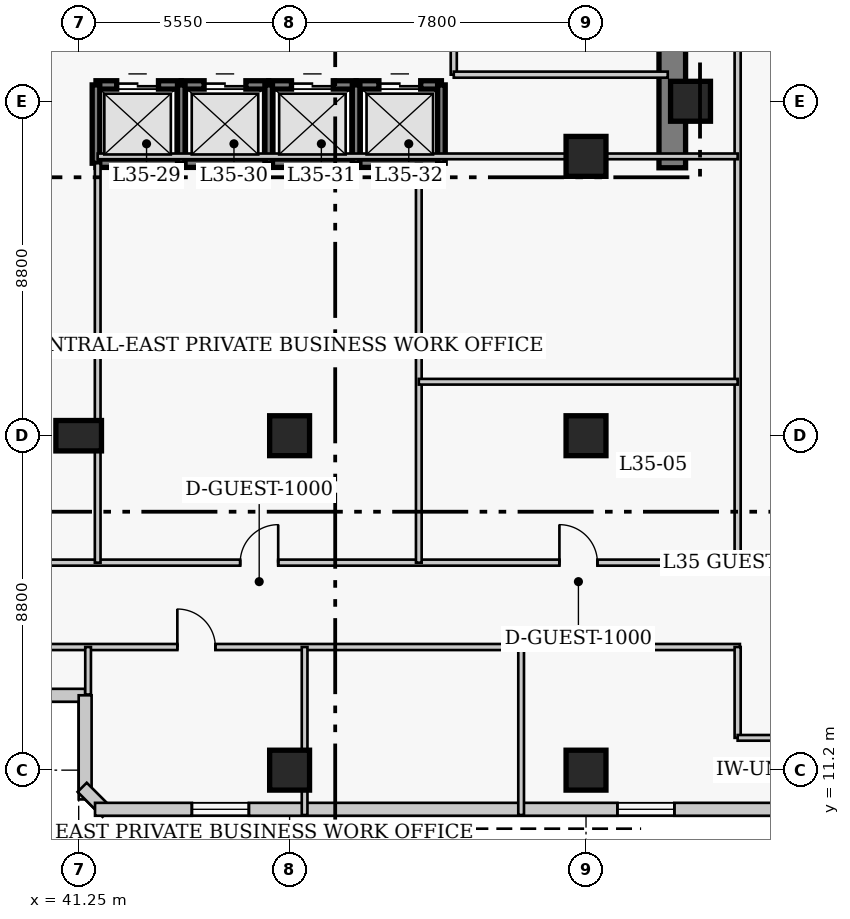
"""IFC4 building model, lengths in metres.
Left out: names, types, materials, properties, quantities, classifications, styles, units other than length and angle.
Written with IfcOpenShell. Run it as: python <this file> out.ifc"""

import sys

from ifc_helpers import new_model, si_unit, direction, frame, frame_2d, origin, origin_2d, place, context, subcontext, project, spatial, rectangle, extrude, element, fill, save


model = new_model("IFC4")
c1 = context("Model", 3, precision=1e-05, world=origin(), true_north=direction((0.0, 1.0)))
c2 = subcontext(c1, "Body", "Model", "MODEL_VIEW")
j1 = project(units=[si_unit("LENGTHUNIT", "METRE"), si_unit("PLANEANGLEUNIT", "RADIAN")], contexts=[c1])
p1 = place(None, origin())
s1 = spatial("IfcSite", under=j1, at=p1, CompositionType="ELEMENT")
p2 = place(p1, origin())
s2 = spatial("IfcBuilding", under=s1, at=p2, CompositionType="ELEMENT")
p3 = place(p2, frame((0.0, 0.0, 142.2)))
s3 = spatial("IfcBuildingStorey", under=s2, at=p3, CompositionType="ELEMENT", Elevation=142.2)
p4 = place(p3, frame((56.87, 27.05, 0.0), z_axis=(0.0, 0.0, 1.0), x_axis=(0.0, 1.0, 0.0)))
e1 = element("IfcWall", 1, at=p4, inside=s3, PredefinedType="SHEAR", context=c2, shape_type="SweptSolid", body=[
    extrude(rectangle(XDim=13.62, YDim=0.7, at=frame_2d((6.81, 0.0))), origin(), (0.0, 0.0, 1.0), 3.8),
])
p5 = place(p3, frame((41.25, 20.0, 0.0), z_axis=(0.0, 0.0, 1.0), x_axis=(1.0, 0.0, 0.0)))
e2 = element("IfcColumn", 2, at=p5, inside=s3, PredefinedType="COLUMN", context=c2, shape_type="SweptSolid", body=[
    extrude(rectangle(XDim=1.2, YDim=0.8, at=origin_2d()), origin(), (0.0, 0.0, 1.0), 3.8),
])
for number, where, z_axis, x_axis in (
    (3, (46.8, 11.2, 0.0), (0.0, 0.0, 1.0), (1.0, 0.0, 0.0)),
    (4, (46.8, 20.0, 0.0), (0.0, 0.0, 1.0), (1.0, 0.0, 0.0)),
    (5, (54.6, 11.2, 0.0), (0.0, 0.0, 1.0), (1.0, 0.0, 0.0)),
    (6, (54.6, 20.0, 0.0), (0.0, 0.0, 1.0), (1.0, 0.0, 0.0)),
    (7, (57.35, 28.8, 0.0), (0.0, 0.0, 1.0), (1.0, 0.0, 0.0)),
    (8, (54.6, 27.35, 0.0), (0.0, 0.0, 1.0), (1.0, 0.0, 0.0)),
):
    element("IfcColumn", number, at=place(p3, frame(where, z_axis=z_axis, x_axis=x_axis)), inside=s3, PredefinedType="COLUMN", context=c2, shape_type="SweptSolid", body=[
        extrude(rectangle(XDim=1.05, YDim=1.05, at=origin_2d()), origin(), (0.0, 0.0, 1.0), 3.8),
    ])
p6 = place(p3, frame((36.58, 13.17, 0.0), z_axis=(0.0, 0.0, 1.0), x_axis=(1.0, 0.0, 0.0)))
e9 = element("IfcWall", 9, at=p6, inside=s3, PredefinedType="SOLIDWALL", context=c2, shape_type="SweptSolid", body=[
    extrude(rectangle(XDim=4.84, YDim=0.34, at=frame_2d((2.42, 0.0))), origin(), (0.0, 0.0, 1.0), 3.55),
])
p7 = place(p6, frame((1.67, 0.0, 0.85)))
e10 = element("IfcOpeningElement", 10, at=p7, cuts=e9, PredefinedType="OPENING", context=c2, shape_type="SweptSolid", body=[
    extrude(rectangle(XDim=1.5, YDim=1.75, at=frame_2d((0.75, 0.875))), frame((0.0, 0.18, 0.0), z_axis=(0.0, -1.0, 0.0), x_axis=(1.0, 0.0, 0.0)), (0.0, 0.0, 1.0), 0.36),
])
p8 = place(p3, frame((41.42, 13.17, 0.0), z_axis=(0.0, 0.0, 1.0), x_axis=(0.0, -1.0, 0.0)))
e11 = element("IfcWall", 11, at=p8, inside=s3, PredefinedType="SOLIDWALL", context=c2, shape_type="SweptSolid", body=[
    extrude(rectangle(XDim=2.74, YDim=0.34, at=frame_2d((1.37, 0.0))), origin(), (0.0, 0.0, 1.0), 3.55),
])
p9 = place(p3, frame((41.342, 10.749, 0.0), z_axis=(0.0, 0.0, 1.0), x_axis=(0.707106781187, -0.707106781187, 0.0)))
e12 = element("IfcWall", 12, at=p9, inside=s3, PredefinedType="SOLIDWALL", context=c2, shape_type="SweptSolid", body=[
    extrude(rectangle(XDim=0.929, YDim=0.34, at=frame_2d((0.464, 0.0))), origin(), (0.0, 0.0, 1.0), 3.55),
])
p10 = place(p3, frame((41.68, 10.17, 0.0), z_axis=(0.0, 0.0, 1.0), x_axis=(1.0, 0.0, 0.0)))
e13 = element("IfcWall", 13, at=p10, inside=s3, PredefinedType="SOLIDWALL", context=c2, shape_type="SweptSolid", body=[
    extrude(rectangle(XDim=26.69, YDim=0.34, at=frame_2d((13.345, 0.0))), origin(), (0.0, 0.0, 1.0), 3.55),
])
p11 = place(p10, frame((2.548, 0.0, 0.85)))
e14 = element("IfcOpeningElement", 14, at=p11, cuts=e13, PredefinedType="OPENING", context=c2, shape_type="SweptSolid", body=[
    extrude(rectangle(XDim=1.5, YDim=1.75, at=frame_2d((0.75, 0.875))), frame((0.0, 0.18, 0.0), z_axis=(0.0, -1.0, 0.0), x_axis=(1.0, 0.0, 0.0)), (0.0, 0.0, 1.0), 0.36),
])
p12 = place(p10, frame((13.745, 0.0, 0.85)))
e15 = element("IfcOpeningElement", 15, at=p12, cuts=e13, PredefinedType="OPENING", context=c2, shape_type="SweptSolid", body=[
    extrude(rectangle(XDim=1.5, YDim=1.75, at=frame_2d((0.75, 0.875))), frame((0.0, 0.18, 0.0), z_axis=(0.0, -1.0, 0.0), x_axis=(1.0, 0.0, 0.0)), (0.0, 0.0, 1.0), 0.36),
])
p13 = place(p10, frame((21.492, 0.0, 0.85)))
e16 = element("IfcOpeningElement", 16, at=p13, cuts=e13, PredefinedType="OPENING", context=c2, shape_type="SweptSolid", body=[
    extrude(rectangle(XDim=1.5, YDim=1.75, at=frame_2d((0.75, 0.875))), frame((0.0, 0.18, 0.0), z_axis=(0.0, -1.0, 0.0), x_axis=(1.0, 0.0, 0.0)), (0.0, 0.0, 1.0), 0.36),
])
p14 = place(p3, frame((41.705, 29.23, 0.0), z_axis=(0.0, 0.0, 1.0), x_axis=(1.0, 0.0, 0.0)))
e17 = element("IfcWall", 17, at=p14, inside=s3, PredefinedType="SHEAR", context=c2, shape_type="SweptSolid", body=[
    extrude(rectangle(XDim=2.245, YDim=0.22, at=frame_2d((1.123, 0.0))), origin(), (0.0, 0.0, 1.0), 3.8),
])
p15 = place(p14, frame((0.545, 0.0, 0.0)))
e18 = element("IfcOpeningElement", 18, at=p15, cuts=e17, PredefinedType="OPENING", context=c2, shape_type="SweptSolid", body=[
    extrude(rectangle(XDim=1.1, YDim=2.15, at=frame_2d((0.55, 1.075))), frame((0.0, 0.12, 0.0), z_axis=(0.0, -1.0, 0.0), x_axis=(1.0, 0.0, 0.0)), (0.0, 0.0, 1.0), 0.24),
])
p16 = place(p3, frame((41.705, 27.17, 0.0), z_axis=(0.0, 0.0, 1.0), x_axis=(1.0, 0.0, 0.0)))
e19 = element("IfcWall", 19, at=p16, inside=s3, PredefinedType="SHEAR", context=c2, shape_type="SweptSolid", body=[
    extrude(rectangle(XDim=2.245, YDim=0.22, at=frame_2d((1.123, 0.0))), origin(), (0.0, 0.0, 1.0), 3.8),
])
p17 = place(p3, frame((41.705, 27.17, 0.0), z_axis=(0.0, 0.0, 1.0), x_axis=(0.0, 1.0, 0.0)))
e20 = element("IfcWall", 20, at=p17, inside=s3, PredefinedType="SHEAR", context=c2, shape_type="SweptSolid", body=[
    extrude(rectangle(XDim=2.06, YDim=0.2, at=frame_2d((1.03, 0.0))), origin(), (0.0, 0.0, 1.0), 3.8),
])
p18 = place(p3, frame((43.95, 29.23, 0.0), z_axis=(0.0, 0.0, 1.0), x_axis=(1.0, 0.0, 0.0)))
e21 = element("IfcWall", 21, at=p18, inside=s3, PredefinedType="SHEAR", context=c2, shape_type="SweptSolid", body=[
    extrude(rectangle(XDim=2.3, YDim=0.22, at=frame_2d((1.15, 0.0))), origin(), (0.0, 0.0, 1.0), 3.8),
])
p19 = place(p18, frame((0.6, 0.0, 0.0)))
e22 = element("IfcOpeningElement", 22, at=p19, cuts=e21, PredefinedType="OPENING", context=c2, shape_type="SweptSolid", body=[
    extrude(rectangle(XDim=1.1, YDim=2.15, at=frame_2d((0.55, 1.075))), frame((0.0, 0.12, 0.0), z_axis=(0.0, -1.0, 0.0), x_axis=(1.0, 0.0, 0.0)), (0.0, 0.0, 1.0), 0.24),
])
p20 = place(p3, frame((43.95, 27.17, 0.0), z_axis=(0.0, 0.0, 1.0), x_axis=(1.0, 0.0, 0.0)))
e23 = element("IfcWall", 23, at=p20, inside=s3, PredefinedType="SHEAR", context=c2, shape_type="SweptSolid", body=[
    extrude(rectangle(XDim=2.3, YDim=0.22, at=frame_2d((1.15, 0.0))), origin(), (0.0, 0.0, 1.0), 3.8),
])
p21 = place(p3, frame((43.95, 27.17, 0.0), z_axis=(0.0, 0.0, 1.0), x_axis=(0.0, 1.0, 0.0)))
e24 = element("IfcWall", 24, at=p21, inside=s3, PredefinedType="SHEAR", context=c2, shape_type="SweptSolid", body=[
    extrude(rectangle(XDim=2.06, YDim=0.2, at=frame_2d((1.03, 0.0))), origin(), (0.0, 0.0, 1.0), 3.8),
])
p22 = place(p3, frame((46.25, 29.23, 0.0), z_axis=(0.0, 0.0, 1.0), x_axis=(1.0, 0.0, 0.0)))
e25 = element("IfcWall", 25, at=p22, inside=s3, PredefinedType="SHEAR", context=c2, shape_type="SweptSolid", body=[
    extrude(rectangle(XDim=2.3, YDim=0.22, at=frame_2d((1.15, 0.0))), origin(), (0.0, 0.0, 1.0), 3.8),
])
p23 = place(p22, frame((0.6, 0.0, 0.0)))
e26 = element("IfcOpeningElement", 26, at=p23, cuts=e25, PredefinedType="OPENING", context=c2, shape_type="SweptSolid", body=[
    extrude(rectangle(XDim=1.1, YDim=2.15, at=frame_2d((0.55, 1.075))), frame((0.0, 0.12, 0.0), z_axis=(0.0, -1.0, 0.0), x_axis=(1.0, 0.0, 0.0)), (0.0, 0.0, 1.0), 0.24),
])
p24 = place(p3, frame((46.25, 27.17, 0.0), z_axis=(0.0, 0.0, 1.0), x_axis=(1.0, 0.0, 0.0)))
e27 = element("IfcWall", 27, at=p24, inside=s3, PredefinedType="SHEAR", context=c2, shape_type="SweptSolid", body=[
    extrude(rectangle(XDim=2.3, YDim=0.22, at=frame_2d((1.15, 0.0))), origin(), (0.0, 0.0, 1.0), 3.8),
])
p25 = place(p3, frame((46.25, 27.17, 0.0), z_axis=(0.0, 0.0, 1.0), x_axis=(0.0, 1.0, 0.0)))
e28 = element("IfcWall", 28, at=p25, inside=s3, PredefinedType="SHEAR", context=c2, shape_type="SweptSolid", body=[
    extrude(rectangle(XDim=2.06, YDim=0.2, at=frame_2d((1.03, 0.0))), origin(), (0.0, 0.0, 1.0), 3.8),
])
p26 = place(p3, frame((48.55, 29.23, 0.0), z_axis=(0.0, 0.0, 1.0), x_axis=(1.0, 0.0, 0.0)))
e29 = element("IfcWall", 29, at=p26, inside=s3, PredefinedType="SHEAR", context=c2, shape_type="SweptSolid", body=[
    extrude(rectangle(XDim=2.245, YDim=0.22, at=frame_2d((1.123, 0.0))), origin(), (0.0, 0.0, 1.0), 3.8),
])
p27 = place(p26, frame((0.6, 0.0, 0.0)))
e30 = element("IfcOpeningElement", 30, at=p27, cuts=e29, PredefinedType="OPENING", context=c2, shape_type="SweptSolid", body=[
    extrude(rectangle(XDim=1.1, YDim=2.15, at=frame_2d((0.55, 1.075))), frame((0.0, 0.12, 0.0), z_axis=(0.0, -1.0, 0.0), x_axis=(1.0, 0.0, 0.0)), (0.0, 0.0, 1.0), 0.24),
])
p28 = place(p3, frame((48.55, 27.17, 0.0), z_axis=(0.0, 0.0, 1.0), x_axis=(1.0, 0.0, 0.0)))
e31 = element("IfcWall", 31, at=p28, inside=s3, PredefinedType="SHEAR", context=c2, shape_type="SweptSolid", body=[
    extrude(rectangle(XDim=2.245, YDim=0.22, at=frame_2d((1.123, 0.0))), origin(), (0.0, 0.0, 1.0), 3.8),
])
for number, where, z_axis, x_axis in (
    (32, (48.55, 27.17, 0.0), (0.0, 0.0, 1.0), (0.0, 1.0, 0.0)),
    (33, (50.795, 27.17, 0.0), (0.0, 0.0, 1.0), (0.0, 1.0, 0.0)),
):
    element("IfcWall", number, at=place(p3, frame(where, z_axis=z_axis, x_axis=x_axis)), inside=s3, PredefinedType="SHEAR", context=c2, shape_type="SweptSolid", body=[
        extrude(rectangle(XDim=2.06, YDim=0.2, at=frame_2d((1.03, 0.0))), origin(), (0.0, 0.0, 1.0), 3.8),
    ])
p29 = place(p3, frame((51.12, 29.5, 0.0), z_axis=(0.0, 0.0, 1.0), x_axis=(0.0, 1.0, 0.0)))
e34 = element("IfcWall", 34, at=p29, inside=s3, PredefinedType="PARTITIONING", context=c2, shape_type="SweptSolid", body=[
    extrude(rectangle(XDim=3.7, YDim=0.16, at=frame_2d((1.85, 0.0))), origin(), (0.0, 0.0, 1.0), 3.55),
])
p30 = place(p29, frame((0.9, 0.0, 0.0)))
e35 = element("IfcOpeningElement", 35, at=p30, cuts=e34, PredefinedType="OPENING", context=c2, shape_type="SweptSolid", body=[
    extrude(rectangle(XDim=1.1, YDim=2.15, at=frame_2d((0.55, 1.075))), frame((0.0, 0.09, 0.0), z_axis=(0.0, -1.0, 0.0), x_axis=(1.0, 0.0, 0.0)), (0.0, 0.0, 1.0), 0.18),
])
p31 = place(p3, frame((51.12, 29.5, 0.0), z_axis=(0.0, 0.0, 1.0), x_axis=(1.0, 0.0, 0.0)))
e36 = element("IfcWall", 36, at=p31, inside=s3, PredefinedType="PARTITIONING", context=c2, shape_type="SweptSolid", body=[
    extrude(rectangle(XDim=5.63, YDim=0.16, at=frame_2d((2.815, 0.0))), origin(), (0.0, 0.0, 1.0), 3.55),
])
p32 = place(p3, frame((35.85, 16.66, 0.0), z_axis=(0.0, 0.0, 1.0), x_axis=(1.0, 0.0, 0.0)))
e37 = element("IfcWall", 37, at=p32, inside=s3, PredefinedType="PARTITIONING", context=c2, shape_type="SweptSolid", body=[
    extrude(rectangle(XDim=22.8, YDim=0.16, at=frame_2d((11.4, 0.0))), origin(), (0.0, 0.0, 1.0), 3.55),
])
p33 = place(p32, frame((9.65, 0.0, 0.0)))
e38 = element("IfcOpeningElement", 38, at=p33, cuts=e37, PredefinedType="OPENING", context=c2, shape_type="SweptSolid", body=[
    extrude(rectangle(XDim=1.0, YDim=2.15, at=frame_2d((0.5, 1.075))), frame((0.0, 0.09, 0.0), z_axis=(0.0, -1.0, 0.0), x_axis=(1.0, 0.0, 0.0)), (0.0, 0.0, 1.0), 0.18),
])
p34 = place(p32, frame((18.05, 0.0, 0.0)))
e39 = element("IfcOpeningElement", 39, at=p34, cuts=e37, PredefinedType="OPENING", context=c2, shape_type="SweptSolid", body=[
    extrude(rectangle(XDim=1.0, YDim=2.15, at=frame_2d((0.5, 1.075))), frame((0.0, 0.09, 0.0), z_axis=(0.0, -1.0, 0.0), x_axis=(1.0, 0.0, 0.0)), (0.0, 0.0, 1.0), 0.18),
])
p35 = place(p3, frame((35.8, 14.44, 0.0), z_axis=(0.0, 0.0, 1.0), x_axis=(1.0, 0.0, 0.0)))
e40 = element("IfcWall", 40, at=p35, inside=s3, PredefinedType="PARTITIONING", context=c2, shape_type="SweptSolid", body=[
    extrude(rectangle(XDim=22.85, YDim=0.16, at=frame_2d((11.425, 0.0))), origin(), (0.0, 0.0, 1.0), 3.55),
])
p36 = place(p35, frame((8.046, 0.0, 0.0)))
e41 = element("IfcOpeningElement", 41, at=p36, cuts=e40, PredefinedType="OPENING", context=c2, shape_type="SweptSolid", body=[
    extrude(rectangle(XDim=1.0, YDim=2.15, at=frame_2d((0.5, 1.075))), frame((0.0, 0.09, 0.0), z_axis=(0.0, -1.0, 0.0), x_axis=(1.0, 0.0, 0.0)), (0.0, 0.0, 1.0), 0.18),
])
p37 = place(p3, frame((58.59, 16.66, 0.0), z_axis=(0.0, 0.0, 1.0), x_axis=(0.0, 1.0, 0.0)))
e42 = element("IfcWall", 42, at=p37, inside=s3, PredefinedType="PARTITIONING", context=c2, shape_type="SweptSolid", body=[
    extrude(rectangle(XDim=23.99, YDim=0.16, at=frame_2d((11.995, 0.0))), origin(), (0.0, 0.0, 1.0), 3.093),
])
p38 = place(p3, frame((58.59, 12.05, 0.0), z_axis=(0.0, 0.0, 1.0), x_axis=(0.0, 1.0, 0.0)))
e43 = element("IfcWall", 43, at=p38, inside=s3, PredefinedType="PARTITIONING", context=c2, shape_type="SweptSolid", body=[
    extrude(rectangle(XDim=2.39, YDim=0.16, at=frame_2d((1.195, 0.0))), origin(), (0.0, 0.0, 1.0), 3.093),
])
p39 = place(p3, frame((58.59, 12.05, 0.0), z_axis=(0.0, 0.0, 1.0), x_axis=(1.0, 0.0, 0.0)))
e44 = element("IfcWall", 44, at=p39, inside=s3, PredefinedType="PARTITIONING", context=c2, shape_type="SweptSolid", body=[
    extrude(rectangle(XDim=2.22, YDim=0.15, at=frame_2d((1.11, 0.0))), origin(), (0.0, 0.0, 1.0), 3.55),
])
p40 = place(p3, frame((41.75, 16.66, 0.0), z_axis=(0.0, 0.0, 1.0), x_axis=(0.0, 1.0, 0.0)))
e45 = element("IfcWall", 45, at=p40, inside=s3, PredefinedType="PARTITIONING", context=c2, shape_type="SweptSolid", body=[
    extrude(rectangle(XDim=10.51, YDim=0.15, at=frame_2d((5.255, 0.0))), origin(), (0.0, 0.0, 1.0), 3.55),
])
p41 = place(p3, frame((50.2, 16.66, 0.0), z_axis=(0.0, 0.0, 1.0), x_axis=(0.0, 1.0, 0.0)))
e46 = element("IfcWall", 46, at=p41, inside=s3, PredefinedType="PARTITIONING", context=c2, shape_type="SweptSolid", body=[
    extrude(rectangle(XDim=10.49, YDim=0.15, at=frame_2d((5.245, 0.0))), origin(), (0.0, 0.0, 1.0), 3.55),
])
p42 = place(p3, frame((41.75, 27.35, 0.0), z_axis=(0.0, 0.0, 1.0), x_axis=(1.0, 0.0, 0.0)))
e47 = element("IfcWall", 47, at=p42, inside=s3, PredefinedType="PARTITIONING", context=c2, shape_type="SweptSolid", body=[
    extrude(rectangle(XDim=16.84, YDim=0.15, at=frame_2d((8.42, 0.0))), origin(), (0.0, 0.0, 1.0), 3.55),
])
p43 = place(p3, frame((50.2, 21.42, 0.0), z_axis=(0.0, 0.0, 1.0), x_axis=(1.0, 0.0, 0.0)))
e48 = element("IfcWall", 48, at=p43, inside=s3, PredefinedType="PARTITIONING", context=c2, shape_type="SweptSolid", body=[
    extrude(rectangle(XDim=8.39, YDim=0.15, at=frame_2d((4.195, 0.0))), origin(), (0.0, 0.0, 1.0), 3.55),
])
p44 = place(p3, frame((41.498, 13.19, 0.0), z_axis=(0.0, 0.0, 1.0), x_axis=(0.0, 1.0, 0.0)))
e49 = element("IfcWall", 49, at=p44, inside=s3, PredefinedType="PARTITIONING", context=c2, shape_type="SweptSolid", body=[
    extrude(rectangle(XDim=1.25, YDim=0.15, at=frame_2d((0.625, 0.0))), origin(), (0.0, 0.0, 1.0), 3.55),
])
for number, where, z_axis, x_axis in (
    (50, (47.195, 10.02, 0.0), (0.0, 0.0, 1.0), (0.0, 1.0, 0.0)),
    (51, (52.893, 10.02, 0.0), (0.0, 0.0, 1.0), (0.0, 1.0, 0.0)),
):
    element("IfcWall", number, at=place(p3, frame(where, z_axis=z_axis, x_axis=x_axis)), inside=s3, PredefinedType="PARTITIONING", context=c2, shape_type="SweptSolid", body=[
        extrude(rectangle(XDim=4.42, YDim=0.15, at=frame_2d((2.21, 0.0))), origin(), (0.0, 0.0, 1.0), 3.55),
    ])
p45 = place(p11, origin())
e52 = element("IfcWindow", 52, at=p45, inside=s3, PartitioningType="SINGLE_PANEL", PredefinedType="WINDOW", context=c2, shape_type="SweptSolid", body=[
    extrude(rectangle(XDim=1.5, YDim=1.75, at=frame_2d((0.75, 0.875))), frame((0.0, 0.03, 0.0), z_axis=(0.0, -1.0, 0.0), x_axis=(1.0, 0.0, 0.0)), (0.0, 0.0, 1.0), 0.06),
])
fill(e14, e52)
p46 = place(p12, origin())
e53 = element("IfcWindow", 53, at=p46, inside=s3, PartitioningType="SINGLE_PANEL", PredefinedType="WINDOW", context=c2, shape_type="SweptSolid", body=[
    extrude(rectangle(XDim=1.5, YDim=1.75, at=frame_2d((0.75, 0.875))), frame((0.0, 0.03, 0.0), z_axis=(0.0, -1.0, 0.0), x_axis=(1.0, 0.0, 0.0)), (0.0, 0.0, 1.0), 0.06),
])
fill(e15, e53)
p47 = place(p15, origin())
e54 = element("IfcDoor", 54, at=p47, inside=s3, OperationType="DOUBLE_DOOR_SLIDING", PredefinedType="DOOR", context=c2, shape_type="SweptSolid", body=[
    extrude(rectangle(XDim=1.1, YDim=2.15, at=frame_2d((0.55, 1.075))), frame((0.0, 0.025, 0.0), z_axis=(0.0, -1.0, 0.0), x_axis=(1.0, 0.0, 0.0)), (0.0, 0.0, 1.0), 0.05),
])
fill(e18, e54)
p48 = place(p19, origin())
e55 = element("IfcDoor", 55, at=p48, inside=s3, OperationType="DOUBLE_DOOR_SLIDING", PredefinedType="DOOR", context=c2, shape_type="SweptSolid", body=[
    extrude(rectangle(XDim=1.1, YDim=2.15, at=frame_2d((0.55, 1.075))), frame((0.0, 0.025, 0.0), z_axis=(0.0, -1.0, 0.0), x_axis=(1.0, 0.0, 0.0)), (0.0, 0.0, 1.0), 0.05),
])
fill(e22, e55)
p49 = place(p23, origin())
e56 = element("IfcDoor", 56, at=p49, inside=s3, OperationType="DOUBLE_DOOR_SLIDING", PredefinedType="DOOR", context=c2, shape_type="SweptSolid", body=[
    extrude(rectangle(XDim=1.1, YDim=2.15, at=frame_2d((0.55, 1.075))), frame((0.0, 0.025, 0.0), z_axis=(0.0, -1.0, 0.0), x_axis=(1.0, 0.0, 0.0)), (0.0, 0.0, 1.0), 0.05),
])
fill(e26, e56)
p50 = place(p27, origin())
e57 = element("IfcDoor", 57, at=p50, inside=s3, OperationType="DOUBLE_DOOR_SLIDING", PredefinedType="DOOR", context=c2, shape_type="SweptSolid", body=[
    extrude(rectangle(XDim=1.1, YDim=2.15, at=frame_2d((0.55, 1.075))), frame((0.0, 0.025, 0.0), z_axis=(0.0, -1.0, 0.0), x_axis=(1.0, 0.0, 0.0)), (0.0, 0.0, 1.0), 0.05),
])
fill(e30, e57)
p51 = place(p33, origin())
e58 = element("IfcDoor", 58, at=p51, inside=s3, OperationType="SINGLE_SWING_RIGHT", PredefinedType="DOOR", context=c2, shape_type="SweptSolid", body=[
    extrude(rectangle(XDim=1.0, YDim=2.15, at=frame_2d((0.5, 1.075))), frame((0.0, 0.025, 0.0), z_axis=(0.0, -1.0, 0.0), x_axis=(1.0, 0.0, 0.0)), (0.0, 0.0, 1.0), 0.05),
])
fill(e38, e58)
p52 = place(p34, origin())
e59 = element("IfcDoor", 59, at=p52, inside=s3, OperationType="SINGLE_SWING_LEFT", PredefinedType="DOOR", context=c2, shape_type="SweptSolid", body=[
    extrude(rectangle(XDim=1.0, YDim=2.15, at=frame_2d((0.5, 1.075))), frame((0.0, 0.025, 0.0), z_axis=(0.0, -1.0, 0.0), x_axis=(1.0, 0.0, 0.0)), (0.0, 0.0, 1.0), 0.05),
])
fill(e39, e59)
p53 = place(p36, origin())
e60 = element("IfcDoor", 60, at=p53, inside=s3, OperationType="SINGLE_SWING_LEFT", PredefinedType="DOOR", context=c2, shape_type="SweptSolid", body=[
    extrude(rectangle(XDim=1.0, YDim=2.15, at=frame_2d((0.5, 1.075))), frame((0.0, 0.025, 0.0), z_axis=(0.0, -1.0, 0.0), x_axis=(1.0, 0.0, 0.0)), (0.0, 0.0, 1.0), 0.05),
])
fill(e41, e60)
save(model, sys.argv[1])
